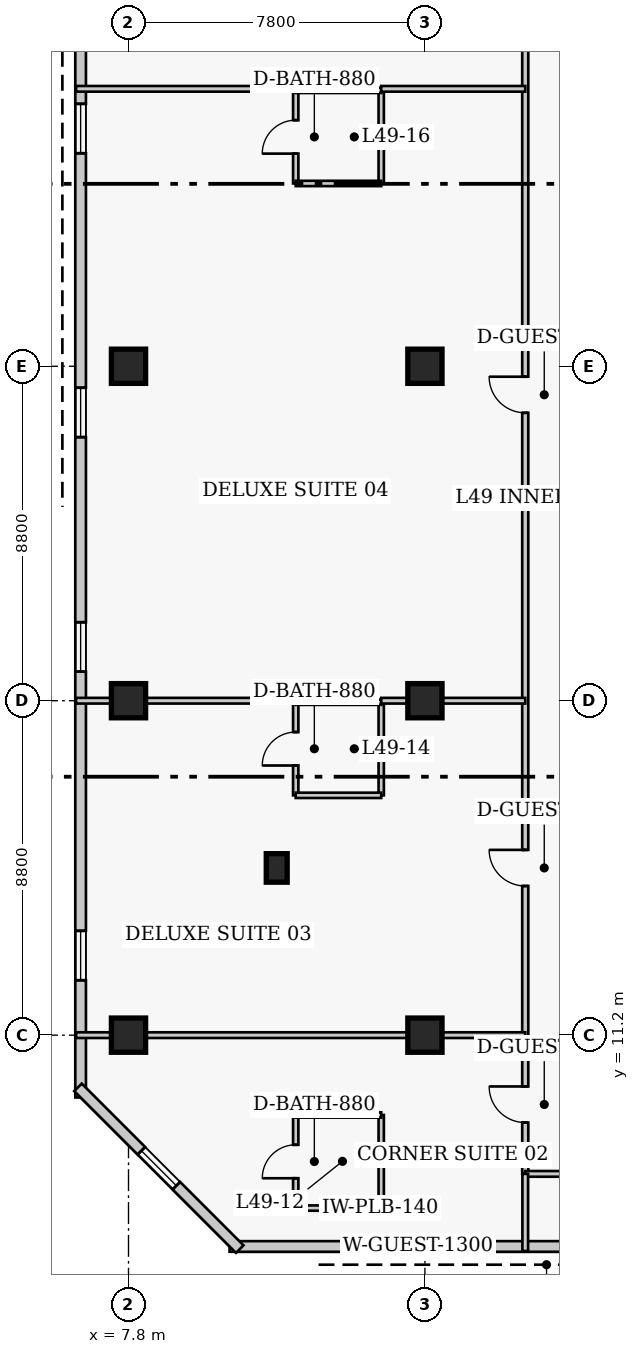
"""IFC4 building model, lengths in metres.
Left out: names, types, materials, properties, quantities, classifications, styles, units other than length and angle.
Written with IfcOpenShell. Run it as: python <this file> out.ifc"""

import sys

from ifc_helpers import new_model, si_unit, direction, frame, frame_2d, origin, origin_2d, place, context, subcontext, project, spatial, rectangle, extrude, element, fill, save


model = new_model("IFC4")
c1 = context("Model", 3, precision=1e-05, world=origin(), true_north=direction((0.0, 1.0)))
c2 = subcontext(c1, "Body", "Model", "MODEL_VIEW")
j1 = project(units=[si_unit("LENGTHUNIT", "METRE"), si_unit("PLANEANGLEUNIT", "RADIAN")], contexts=[c1])
p1 = place(None, origin())
s1 = spatial("IfcSite", under=j1, at=p1, CompositionType="ELEMENT")
p2 = place(p1, origin())
s2 = spatial("IfcBuilding", under=s1, at=p2, CompositionType="ELEMENT")
p3 = place(p2, frame((0.0, 0.0, 196.8)))
s3 = spatial("IfcBuildingStorey", under=s2, at=p3, CompositionType="ELEMENT", Elevation=196.8)
for number, where, z_axis, x_axis in (
    (1, (7.8, 11.2, 0.0), (0.0, 0.0, 1.0), (1.0, 0.0, 0.0)),
    (2, (7.8, 20.0, 0.0), (0.0, 0.0, 1.0), (1.0, 0.0, 0.0)),
    (3, (7.8, 28.8, 0.0), (0.0, 0.0, 1.0), (1.0, 0.0, 0.0)),
    (4, (15.6, 11.2, 0.0), (0.0, 0.0, 1.0), (1.0, 0.0, 0.0)),
    (5, (15.6, 20.0, 0.0), (0.0, 0.0, 1.0), (1.0, 0.0, 0.0)),
    (6, (15.6, 28.8, 0.0), (0.0, 0.0, 1.0), (1.0, 0.0, 0.0)),
):
    element("IfcColumn", number, at=place(p3, frame(where, z_axis=z_axis, x_axis=x_axis)), inside=s3, PredefinedType="COLUMN", context=c2, shape_type="SweptSolid", body=[
        extrude(rectangle(XDim=0.9, YDim=0.9, at=origin_2d()), origin(), (0.0, 0.0, 1.0), 3.9),
    ])
p4 = place(p3, frame((11.7, 15.6, 0.0), z_axis=(0.0, 0.0, 1.0), x_axis=(1.0, 0.0, 0.0)))
e7 = element("IfcColumn", 7, at=p4, inside=s3, PredefinedType="PILASTER", context=c2, shape_type="SweptSolid", body=[
    extrude(rectangle(XDim=0.55, YDim=0.75, at=origin_2d()), origin(), (0.0, 0.0, 1.0), 3.9),
])
p5 = place(p3, frame((10.46, 5.64, 0.0), z_axis=(0.0, 0.0, 1.0), x_axis=(1.0, 0.0, 0.0)))
e8 = element("IfcWall", 8, at=p5, inside=s3, PredefinedType="SOLIDWALL", context=c2, shape_type="SweptSolid", body=[
    extrude(rectangle(XDim=25.83, YDim=0.28, at=frame_2d((12.915, 0.0))), origin(), (0.0, 0.0, 1.0), 3.65),
])
p6 = place(p5, frame((4.305, 0.0, 0.85)))
e9 = element("IfcOpeningElement", 9, at=p6, cuts=e8, PredefinedType="OPENING", context=c2, shape_type="SweptSolid", body=[
    extrude(rectangle(XDim=1.3, YDim=1.7, at=frame_2d((0.65, 0.85))), frame((0.0, 0.15, 0.0), z_axis=(0.0, -1.0, 0.0), x_axis=(1.0, 0.0, 0.0)), (0.0, 0.0, 1.0), 0.3),
])
p7 = place(p5, frame((11.115, 0.0, 0.85)))
e10 = element("IfcOpeningElement", 10, at=p7, cuts=e8, PredefinedType="OPENING", context=c2, shape_type="SweptSolid", body=[
    extrude(rectangle(XDim=1.3, YDim=1.7, at=frame_2d((0.65, 0.85))), frame((0.0, 0.15, 0.0), z_axis=(0.0, -1.0, 0.0), x_axis=(1.0, 0.0, 0.0)), (0.0, 0.0, 1.0), 0.3),
])
p8 = place(p5, frame((21.525, 0.0, 0.85)))
e11 = element("IfcOpeningElement", 11, at=p8, cuts=e8, PredefinedType="OPENING", context=c2, shape_type="SweptSolid", body=[
    extrude(rectangle(XDim=1.3, YDim=1.7, at=frame_2d((0.65, 0.85))), frame((0.0, 0.15, 0.0), z_axis=(0.0, -1.0, 0.0), x_axis=(1.0, 0.0, 0.0)), (0.0, 0.0, 1.0), 0.3),
])
p9 = place(p3, frame((6.54, 39.44, 0.0), z_axis=(0.0, 0.0, 1.0), x_axis=(0.0, -1.0, 0.0)))
e12 = element("IfcWall", 12, at=p9, inside=s3, PredefinedType="SOLIDWALL", context=c2, shape_type="SweptSolid", body=[
    extrude(rectangle(XDim=29.88, YDim=0.28, at=frame_2d((14.94, 0.0))), origin(), (0.0, 0.0, 1.0), 3.65),
])
p10 = place(p9, frame((3.735, 0.0, 0.85)))
e13 = element("IfcOpeningElement", 13, at=p10, cuts=e12, PredefinedType="OPENING", context=c2, shape_type="SweptSolid", body=[
    extrude(rectangle(XDim=1.3, YDim=1.7, at=frame_2d((0.65, 0.85))), frame((0.0, 0.15, 0.0), z_axis=(0.0, -1.0, 0.0), x_axis=(1.0, 0.0, 0.0)), (0.0, 0.0, 1.0), 0.3),
])
p11 = place(p9, frame((11.205, 0.0, 0.85)))
e14 = element("IfcOpeningElement", 14, at=p11, cuts=e12, PredefinedType="OPENING", context=c2, shape_type="SweptSolid", body=[
    extrude(rectangle(XDim=1.3, YDim=1.7, at=frame_2d((0.65, 0.85))), frame((0.0, 0.15, 0.0), z_axis=(0.0, -1.0, 0.0), x_axis=(1.0, 0.0, 0.0)), (0.0, 0.0, 1.0), 0.3),
])
p12 = place(p9, frame((17.375, 0.0, 0.85)))
e15 = element("IfcOpeningElement", 15, at=p12, cuts=e12, PredefinedType="OPENING", context=c2, shape_type="SweptSolid", body=[
    extrude(rectangle(XDim=1.3, YDim=1.7, at=frame_2d((0.65, 0.85))), frame((0.0, 0.15, 0.0), z_axis=(0.0, -1.0, 0.0), x_axis=(1.0, 0.0, 0.0)), (0.0, 0.0, 1.0), 0.3),
])
p13 = place(p9, frame((25.495, 0.0, 0.85)))
e16 = element("IfcOpeningElement", 16, at=p13, cuts=e12, PredefinedType="OPENING", context=c2, shape_type="SweptSolid", body=[
    extrude(rectangle(XDim=1.3, YDim=1.7, at=frame_2d((0.65, 0.85))), frame((0.0, 0.15, 0.0), z_axis=(0.0, -1.0, 0.0), x_axis=(1.0, 0.0, 0.0)), (0.0, 0.0, 1.0), 0.3),
])
p14 = place(p3, frame((6.471, 9.827, 0.0), z_axis=(0.0, 0.0, 1.0), x_axis=(0.707106781187, -0.707106781187, 0.0)))
e17 = element("IfcWall", 17, at=p14, inside=s3, PredefinedType="SOLIDWALL", context=c2, shape_type="SweptSolid", body=[
    extrude(rectangle(XDim=6.02, YDim=0.28, at=frame_2d((3.01, 0.0))), origin(), (0.0, 0.0, 1.0), 3.65),
])
p15 = place(p14, frame((2.36, 0.0, 0.85)))
e18 = element("IfcOpeningElement", 18, at=p15, cuts=e17, PredefinedType="OPENING", context=c2, shape_type="SweptSolid", body=[
    extrude(rectangle(XDim=1.3, YDim=1.7, at=frame_2d((0.65, 0.85))), frame((0.0, 0.15, 0.0), z_axis=(0.0, -1.0, 0.0), x_axis=(1.0, 0.0, 0.0)), (0.0, 0.0, 1.0), 0.3),
])
p16 = place(p3, frame((18.24, 7.55, 0.0), z_axis=(0.0, 0.0, 1.0), x_axis=(0.0, 1.0, 0.0)))
e19 = element("IfcWall", 19, at=p16, inside=s3, PredefinedType="PARTITIONING", context=c2, shape_type="SweptSolid", body=[
    extrude(rectangle(XDim=33.1, YDim=0.16, at=frame_2d((16.55, 0.0))), origin(), (0.0, 0.0, 1.0), 3.65),
])
p17 = place(p16, frame((1.35, 0.0, 0.0)))
e20 = element("IfcOpeningElement", 20, at=p17, cuts=e19, PredefinedType="OPENING", context=c2, shape_type="SweptSolid", body=[
    extrude(rectangle(XDim=0.95, YDim=2.1, at=frame_2d((0.475, 1.05))), frame((0.0, 0.09, 0.0), z_axis=(0.0, -1.0, 0.0), x_axis=(1.0, 0.0, 0.0)), (0.0, 0.0, 1.0), 0.18),
])
p18 = place(p16, frame((7.575, 0.0, 0.0)))
e21 = element("IfcOpeningElement", 21, at=p18, cuts=e19, PredefinedType="OPENING", context=c2, shape_type="SweptSolid", body=[
    extrude(rectangle(XDim=0.95, YDim=2.1, at=frame_2d((0.475, 1.05))), frame((0.0, 0.09, 0.0), z_axis=(0.0, -1.0, 0.0), x_axis=(1.0, 0.0, 0.0)), (0.0, 0.0, 1.0), 0.18),
])
p19 = place(p16, frame((20.025, 0.0, 0.0)))
e22 = element("IfcOpeningElement", 22, at=p19, cuts=e19, PredefinedType="OPENING", context=c2, shape_type="SweptSolid", body=[
    extrude(rectangle(XDim=0.95, YDim=2.1, at=frame_2d((0.475, 1.05))), frame((0.0, 0.09, 0.0), z_axis=(0.0, -1.0, 0.0), x_axis=(1.0, 0.0, 0.0)), (0.0, 0.0, 1.0), 0.18),
])
p20 = place(p16, frame((30.38, 0.0, 0.0)))
e23 = element("IfcOpeningElement", 23, at=p20, cuts=e19, PredefinedType="OPENING", context=c2, shape_type="SweptSolid", body=[
    extrude(rectangle(XDim=1.0, YDim=2.15, at=frame_2d((0.5, 1.075))), frame((0.0, 0.09, 0.0), z_axis=(0.0, -1.0, 0.0), x_axis=(1.0, 0.0, 0.0)), (0.0, 0.0, 1.0), 0.18),
])
p21 = place(p3, frame((18.24, 7.55, 0.0), z_axis=(0.0, 0.0, 1.0), x_axis=(1.0, 0.0, 0.0)))
e24 = element("IfcWall", 24, at=p21, inside=s3, PredefinedType="PARTITIONING", context=c2, shape_type="SweptSolid", body=[
    extrude(rectangle(XDim=2.22, YDim=0.15, at=frame_2d((1.11, 0.0))), origin(), (0.0, 0.0, 1.0), 3.65),
])
p22 = place(p3, frame((18.24, 5.52, 0.0), z_axis=(0.0, 0.0, 1.0), x_axis=(0.0, 1.0, 0.0)))
e25 = element("IfcWall", 25, at=p22, inside=s3, PredefinedType="PARTITIONING", context=c2, shape_type="SweptSolid", body=[
    extrude(rectangle(XDim=2.03, YDim=0.15, at=frame_2d((1.015, 0.0))), origin(), (0.0, 0.0, 1.0), 3.65),
])
p23 = place(p3, frame((12.2, 6.65, 0.0), z_axis=(0.0, 0.0, 1.0), x_axis=(0.0, 1.0, 0.0)))
e26 = element("IfcWall", 26, at=p23, inside=s3, PredefinedType="PLUMBINGWALL", context=c2, shape_type="SweptSolid", body=[
    extrude(rectangle(XDim=2.45, YDim=0.14, at=frame_2d((1.225, 0.0))), origin(), (0.0, 0.0, 1.0), 3.65),
])
p24 = place(p23, frame((0.785, 0.0, 0.0)))
e27 = element("IfcOpeningElement", 27, at=p24, cuts=e26, PredefinedType="OPENING", context=c2, shape_type="SweptSolid", body=[
    extrude(rectangle(XDim=0.88, YDim=2.05, at=frame_2d((0.44, 1.025))), frame((0.0, 0.08, 0.0), z_axis=(0.0, -1.0, 0.0), x_axis=(1.0, 0.0, 0.0)), (0.0, 0.0, 1.0), 0.16),
])
p25 = place(p3, frame((14.45, 6.65, 0.0), z_axis=(0.0, 0.0, 1.0), x_axis=(0.0, 1.0, 0.0)))
e28 = element("IfcWall", 28, at=p25, inside=s3, PredefinedType="PLUMBINGWALL", context=c2, shape_type="SweptSolid", body=[
    extrude(rectangle(XDim=2.45, YDim=0.14, at=frame_2d((1.225, 0.0))), origin(), (0.0, 0.0, 1.0), 3.65),
])
for number, where, z_axis, x_axis in (
    (29, (12.2, 6.65, 0.0), (0.0, 0.0, 1.0), (1.0, 0.0, 0.0)),
    (30, (12.2, 9.1, 0.0), (0.0, 0.0, 1.0), (1.0, 0.0, 0.0)),
):
    element("IfcWall", number, at=place(p3, frame(where, z_axis=z_axis, x_axis=x_axis)), inside=s3, PredefinedType="PLUMBINGWALL", context=c2, shape_type="SweptSolid", body=[
        extrude(rectangle(XDim=2.25, YDim=0.14, at=frame_2d((1.125, 0.0))), origin(), (0.0, 0.0, 1.0), 3.65),
    ])
p26 = place(p3, frame((6.42, 11.2, 0.0), z_axis=(0.0, 0.0, 1.0), x_axis=(1.0, 0.0, 0.0)))
e31 = element("IfcWall", 31, at=p26, inside=s3, PredefinedType="PARTITIONING", context=c2, shape_type="SweptSolid", body=[
    extrude(rectangle(XDim=11.82, YDim=0.15, at=frame_2d((5.91, 0.0))), origin(), (0.0, 0.0, 1.0), 2.878),
])
p27 = place(p3, frame((12.2, 17.51, 0.0), z_axis=(0.0, 0.0, 1.0), x_axis=(0.0, 1.0, 0.0)))
e32 = element("IfcWall", 32, at=p27, inside=s3, PredefinedType="PLUMBINGWALL", context=c2, shape_type="SweptSolid", body=[
    extrude(rectangle(XDim=2.45, YDim=0.14, at=frame_2d((1.225, 0.0))), origin(), (0.0, 0.0, 1.0), 3.65),
])
p28 = place(p27, frame((0.785, 0.0, 0.0)))
e33 = element("IfcOpeningElement", 33, at=p28, cuts=e32, PredefinedType="OPENING", context=c2, shape_type="SweptSolid", body=[
    extrude(rectangle(XDim=0.88, YDim=2.05, at=frame_2d((0.44, 1.025))), frame((0.0, 0.08, 0.0), z_axis=(0.0, -1.0, 0.0), x_axis=(1.0, 0.0, 0.0)), (0.0, 0.0, 1.0), 0.16),
])
p29 = place(p3, frame((14.45, 17.51, 0.0), z_axis=(0.0, 0.0, 1.0), x_axis=(0.0, 1.0, 0.0)))
e34 = element("IfcWall", 34, at=p29, inside=s3, PredefinedType="PLUMBINGWALL", context=c2, shape_type="SweptSolid", body=[
    extrude(rectangle(XDim=2.45, YDim=0.14, at=frame_2d((1.225, 0.0))), origin(), (0.0, 0.0, 1.0), 3.65),
])
p30 = place(p3, frame((12.2, 17.51, 0.0), z_axis=(0.0, 0.0, 1.0), x_axis=(1.0, 0.0, 0.0)))
e35 = element("IfcWall", 35, at=p30, inside=s3, PredefinedType="PLUMBINGWALL", context=c2, shape_type="SweptSolid", body=[
    extrude(rectangle(XDim=2.25, YDim=0.14, at=frame_2d((1.125, 0.0))), origin(), (0.0, 0.0, 1.0), 3.65),
])
p31 = place(p3, frame((12.2, 19.96, 0.0), z_axis=(0.0, 0.0, 1.0), x_axis=(1.0, 0.0, 0.0)))
e36 = element("IfcWall", 36, at=p31, inside=s3, PredefinedType="PLUMBINGWALL", context=c2, shape_type="SweptSolid", body=[
    extrude(rectangle(XDim=2.25, YDim=0.14, at=frame_2d((1.125, 0.0))), origin(), (0.0, 0.0, 1.0), 3.038),
])
p32 = place(p3, frame((6.42, 20.0, 0.0), z_axis=(0.0, 0.0, 1.0), x_axis=(1.0, 0.0, 0.0)))
e37 = element("IfcWall", 37, at=p32, inside=s3, PredefinedType="PARTITIONING", context=c2, shape_type="SweptSolid", body=[
    extrude(rectangle(XDim=5.78, YDim=0.15, at=frame_2d((2.89, 0.0))), origin(), (0.0, 0.0, 1.0), 2.878),
])
p33 = place(p3, frame((14.45, 20.0, 0.0), z_axis=(0.0, 0.0, 1.0), x_axis=(1.0, 0.0, 0.0)))
e38 = element("IfcWall", 38, at=p33, inside=s3, PredefinedType="PARTITIONING", context=c2, shape_type="SweptSolid", body=[
    extrude(rectangle(XDim=3.79, YDim=0.15, at=frame_2d((1.895, 0.0))), origin(), (0.0, 0.0, 1.0), 2.878),
])
p34 = place(p3, frame((12.2, 33.61, 0.0), z_axis=(0.0, 0.0, 1.0), x_axis=(0.0, 1.0, 0.0)))
e39 = element("IfcWall", 39, at=p34, inside=s3, PredefinedType="PLUMBINGWALL", context=c2, shape_type="SweptSolid", body=[
    extrude(rectangle(XDim=2.45, YDim=0.14, at=frame_2d((1.225, 0.0))), origin(), (0.0, 0.0, 1.0), 3.65),
])
p35 = place(p34, frame((0.785, 0.0, 0.0)))
e40 = element("IfcOpeningElement", 40, at=p35, cuts=e39, PredefinedType="OPENING", context=c2, shape_type="SweptSolid", body=[
    extrude(rectangle(XDim=0.88, YDim=2.05, at=frame_2d((0.44, 1.025))), frame((0.0, 0.08, 0.0), z_axis=(0.0, -1.0, 0.0), x_axis=(1.0, 0.0, 0.0)), (0.0, 0.0, 1.0), 0.16),
])
p36 = place(p3, frame((14.45, 33.61, 0.0), z_axis=(0.0, 0.0, 1.0), x_axis=(0.0, 1.0, 0.0)))
e41 = element("IfcWall", 41, at=p36, inside=s3, PredefinedType="PLUMBINGWALL", context=c2, shape_type="SweptSolid", body=[
    extrude(rectangle(XDim=2.45, YDim=0.14, at=frame_2d((1.225, 0.0))), origin(), (0.0, 0.0, 1.0), 3.65),
])
for number, where, z_axis, x_axis in (
    (42, (12.2, 33.61, 0.0), (0.0, 0.0, 1.0), (1.0, 0.0, 0.0)),
    (43, (12.2, 36.06, 0.0), (0.0, 0.0, 1.0), (1.0, 0.0, 0.0)),
):
    element("IfcWall", number, at=place(p3, frame(where, z_axis=z_axis, x_axis=x_axis)), inside=s3, PredefinedType="PLUMBINGWALL", context=c2, shape_type="SweptSolid", body=[
        extrude(rectangle(XDim=2.25, YDim=0.14, at=frame_2d((1.125, 0.0))), origin(), (0.0, 0.0, 1.0), 3.65),
    ])
p37 = place(p3, frame((6.42, 36.1, 0.0), z_axis=(0.0, 0.0, 1.0), x_axis=(1.0, 0.0, 0.0)))
e44 = element("IfcWall", 44, at=p37, inside=s3, PredefinedType="PARTITIONING", context=c2, shape_type="SweptSolid", body=[
    extrude(rectangle(XDim=5.78, YDim=0.15, at=frame_2d((2.89, 0.0))), origin(), (0.0, 0.0, 1.0), 3.65),
])
p38 = place(p3, frame((14.45, 36.1, 0.0), z_axis=(0.0, 0.0, 1.0), x_axis=(1.0, 0.0, 0.0)))
e45 = element("IfcWall", 45, at=p38, inside=s3, PredefinedType="PARTITIONING", context=c2, shape_type="SweptSolid", body=[
    extrude(rectangle(XDim=3.79, YDim=0.15, at=frame_2d((1.895, 0.0))), origin(), (0.0, 0.0, 1.0), 3.65),
])
p39 = place(p6, origin())
e46 = element("IfcWindow", 46, at=p39, inside=s3, PartitioningType="SINGLE_PANEL", PredefinedType="WINDOW", context=c2, shape_type="SweptSolid", body=[
    extrude(rectangle(XDim=1.3, YDim=1.7, at=frame_2d((0.65, 0.85))), frame((0.0, 0.03, 0.0), z_axis=(0.0, -1.0, 0.0), x_axis=(1.0, 0.0, 0.0)), (0.0, 0.0, 1.0), 0.06),
])
fill(e9, e46)
p40 = place(p10, origin())
e47 = element("IfcWindow", 47, at=p40, inside=s3, PartitioningType="SINGLE_PANEL", PredefinedType="WINDOW", context=c2, shape_type="SweptSolid", body=[
    extrude(rectangle(XDim=1.3, YDim=1.7, at=frame_2d((0.65, 0.85))), frame((0.0, 0.03, 0.0), z_axis=(0.0, -1.0, 0.0), x_axis=(1.0, 0.0, 0.0)), (0.0, 0.0, 1.0), 0.06),
])
fill(e13, e47)
p41 = place(p11, origin())
e48 = element("IfcWindow", 48, at=p41, inside=s3, PartitioningType="SINGLE_PANEL", PredefinedType="WINDOW", context=c2, shape_type="SweptSolid", body=[
    extrude(rectangle(XDim=1.3, YDim=1.7, at=frame_2d((0.65, 0.85))), frame((0.0, 0.03, 0.0), z_axis=(0.0, -1.0, 0.0), x_axis=(1.0, 0.0, 0.0)), (0.0, 0.0, 1.0), 0.06),
])
fill(e14, e48)
p42 = place(p12, origin())
e49 = element("IfcWindow", 49, at=p42, inside=s3, PartitioningType="SINGLE_PANEL", PredefinedType="WINDOW", context=c2, shape_type="SweptSolid", body=[
    extrude(rectangle(XDim=1.3, YDim=1.7, at=frame_2d((0.65, 0.85))), frame((0.0, 0.03, 0.0), z_axis=(0.0, -1.0, 0.0), x_axis=(1.0, 0.0, 0.0)), (0.0, 0.0, 1.0), 0.06),
])
fill(e15, e49)
p43 = place(p13, origin())
e50 = element("IfcWindow", 50, at=p43, inside=s3, PartitioningType="SINGLE_PANEL", PredefinedType="WINDOW", context=c2, shape_type="SweptSolid", body=[
    extrude(rectangle(XDim=1.3, YDim=1.7, at=frame_2d((0.65, 0.85))), frame((0.0, 0.03, 0.0), z_axis=(0.0, -1.0, 0.0), x_axis=(1.0, 0.0, 0.0)), (0.0, 0.0, 1.0), 0.06),
])
fill(e16, e50)
p44 = place(p15, origin())
e51 = element("IfcWindow", 51, at=p44, inside=s3, PartitioningType="SINGLE_PANEL", PredefinedType="WINDOW", context=c2, shape_type="SweptSolid", body=[
    extrude(rectangle(XDim=1.3, YDim=1.7, at=frame_2d((0.65, 0.85))), frame((0.0, 0.03, 0.0), z_axis=(0.0, -1.0, 0.0), x_axis=(1.0, 0.0, 0.0)), (0.0, 0.0, 1.0), 0.06),
])
fill(e18, e51)
p45 = place(p24, origin())
e52 = element("IfcDoor", 52, at=p45, inside=s3, OperationType="SINGLE_SWING_LEFT", PredefinedType="DOOR", context=c2, shape_type="SweptSolid", body=[
    extrude(rectangle(XDim=0.88, YDim=2.05, at=frame_2d((0.44, 1.025))), frame((0.0, 0.025, 0.0), z_axis=(0.0, -1.0, 0.0), x_axis=(1.0, 0.0, 0.0)), (0.0, 0.0, 1.0), 0.05),
])
fill(e27, e52)
p46 = place(p17, origin())
e53 = element("IfcDoor", 53, at=p46, inside=s3, OperationType="SINGLE_SWING_RIGHT", PredefinedType="DOOR", context=c2, shape_type="SweptSolid", body=[
    extrude(rectangle(XDim=0.95, YDim=2.1, at=frame_2d((0.475, 1.05))), frame((0.0, 0.025, 0.0), z_axis=(0.0, -1.0, 0.0), x_axis=(1.0, 0.0, 0.0)), (0.0, 0.0, 1.0), 0.05),
])
fill(e20, e53)
p47 = place(p28, origin())
e54 = element("IfcDoor", 54, at=p47, inside=s3, OperationType="SINGLE_SWING_LEFT", PredefinedType="DOOR", context=c2, shape_type="SweptSolid", body=[
    extrude(rectangle(XDim=0.88, YDim=2.05, at=frame_2d((0.44, 1.025))), frame((0.0, 0.025, 0.0), z_axis=(0.0, -1.0, 0.0), x_axis=(1.0, 0.0, 0.0)), (0.0, 0.0, 1.0), 0.05),
])
fill(e33, e54)
p48 = place(p18, origin())
e55 = element("IfcDoor", 55, at=p48, inside=s3, OperationType="SINGLE_SWING_RIGHT", PredefinedType="DOOR", context=c2, shape_type="SweptSolid", body=[
    extrude(rectangle(XDim=0.95, YDim=2.1, at=frame_2d((0.475, 1.05))), frame((0.0, 0.025, 0.0), z_axis=(0.0, -1.0, 0.0), x_axis=(1.0, 0.0, 0.0)), (0.0, 0.0, 1.0), 0.05),
])
fill(e21, e55)
p49 = place(p35, origin())
e56 = element("IfcDoor", 56, at=p49, inside=s3, OperationType="SINGLE_SWING_LEFT", PredefinedType="DOOR", context=c2, shape_type="SweptSolid", body=[
    extrude(rectangle(XDim=0.88, YDim=2.05, at=frame_2d((0.44, 1.025))), frame((0.0, 0.025, 0.0), z_axis=(0.0, -1.0, 0.0), x_axis=(1.0, 0.0, 0.0)), (0.0, 0.0, 1.0), 0.05),
])
fill(e40, e56)
p50 = place(p19, origin())
e57 = element("IfcDoor", 57, at=p50, inside=s3, OperationType="SINGLE_SWING_RIGHT", PredefinedType="DOOR", context=c2, shape_type="SweptSolid", body=[
    extrude(rectangle(XDim=0.95, YDim=2.1, at=frame_2d((0.475, 1.05))), frame((0.0, 0.025, 0.0), z_axis=(0.0, -1.0, 0.0), x_axis=(1.0, 0.0, 0.0)), (0.0, 0.0, 1.0), 0.05),
])
fill(e22, e57)
save(model, sys.argv[1])
